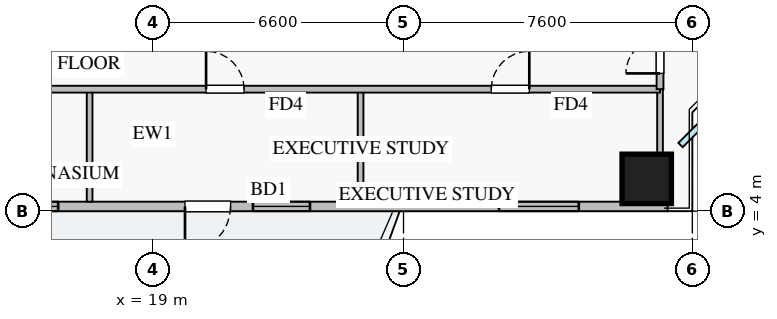
"""IFC4 building model, lengths in metres.
Left out: names, types, materials, properties, quantities, classifications, styles, units other than length and angle.
Written with IfcOpenShell. Run it as: python <this file> out.ifc"""

import sys

from ifc_helpers import new_model, si_unit, direction, frame, frame_2d, origin, origin_2d, place, context, subcontext, project, spatial, rectangle, extrude, source, transform, mapped, element, fill, save


model = new_model("IFC4")
c1 = context("Model", 3, precision=1e-05, world=origin(), true_north=direction((0.0, 1.0)))
c2 = subcontext(c1, "Body", "Model", "MODEL_VIEW")
j1 = project(units=[si_unit("LENGTHUNIT", "METRE"), si_unit("PLANEANGLEUNIT", "RADIAN")], contexts=[c1])
p1 = place(None, origin())
s1 = spatial("IfcSite", under=j1, at=p1, CompositionType="ELEMENT")
p2 = place(p1, origin())
s2 = spatial("IfcBuilding", under=s1, at=p2, CompositionType="ELEMENT")
p3 = place(p2, frame((0.0, 0.0, 89.25)))
s3 = spatial("IfcBuildingStorey", under=s2, at=p3, CompositionType="ELEMENT", Elevation=89.25)
m1 = source(origin(), c2, "Body", "SweptSolid", [
    extrude(rectangle(XDim=1.3, YDim=1.3, at=origin_2d()), origin(), (0.0, 0.0, 1.0), 3.25),
])
p4 = place(p3, frame((32.0, 4.85, 0.0), z_axis=(0.0, 0.0, 1.0), x_axis=(1.0, 0.0, 0.0)))
e1 = element("IfcColumn", 1, at=p4, inside=s3, PredefinedType="COLUMN", context=c2, shape_type="MappedRepresentation", body=[
    mapped(m1, transform((0.0, 0.0, 0.0), x_axis=(1.0, 0.0, 0.0), y_axis=(0.0, 1.0, 0.0), z_axis=(0.0, 0.0, 1.0), scale=1.0)),
])
p5 = place(p3, frame((5.45, 4.125, 0.0), z_axis=(0.0, 0.0, 1.0), x_axis=(1.0, 0.0, 0.0)))
e2 = element("IfcWall", 2, at=p5, inside=s3, PredefinedType="STANDARD", context=c2, shape_type="SweptSolid", body=[
    extrude(rectangle(XDim=27.1, YDim=0.25, at=frame_2d((13.55, 0.0))), origin(), (0.0, 0.0, 1.0), 2.57),
])
p6 = place(p5, frame((14.4, 0.0, 0.0)))
e3 = element("IfcOpeningElement", 3, at=p6, cuts=e2, PredefinedType="OPENING", context=c2, shape_type="SweptSolid", body=[
    extrude(rectangle(XDim=1.2, YDim=2.1, at=frame_2d((0.6, 1.05))), frame((0.0, 0.135, 0.0), z_axis=(0.0, -1.0, 0.0), x_axis=(1.0, 0.0, 0.0)), (0.0, 0.0, 1.0), 0.27),
])
p7 = place(p5, frame((1.45, 0.0, 0.9)))
e4 = element("IfcOpeningElement", 4, at=p7, cuts=e2, PredefinedType="OPENING", context=c2, shape_type="SweptSolid", body=[
    extrude(rectangle(XDim=1.5, YDim=1.5, at=frame_2d((0.75, 0.75))), frame((0.0, 0.135, 0.0), z_axis=(0.0, -1.0, 0.0), x_axis=(1.0, 0.0, 0.0)), (0.0, 0.0, 1.0), 0.27),
])
p8 = place(p5, frame((9.263, 0.0, 0.9)))
e5 = element("IfcOpeningElement", 5, at=p8, cuts=e2, PredefinedType="OPENING", context=c2, shape_type="SweptSolid", body=[
    extrude(rectangle(XDim=1.8, YDim=1.45, at=frame_2d((0.9, 0.725))), frame((0.0, 0.135, 0.0), z_axis=(0.0, -1.0, 0.0), x_axis=(1.0, 0.0, 0.0)), (0.0, 0.0, 1.0), 0.27),
])
p9 = place(p5, frame((16.188, 0.0, 0.9)))
e6 = element("IfcOpeningElement", 6, at=p9, cuts=e2, PredefinedType="OPENING", context=c2, shape_type="SweptSolid", body=[
    extrude(rectangle(XDim=1.5, YDim=1.45, at=frame_2d((0.75, 0.725))), frame((0.0, 0.135, 0.0), z_axis=(0.0, -1.0, 0.0), x_axis=(1.0, 0.0, 0.0)), (0.0, 0.0, 1.0), 0.27),
])
p10 = place(p5, frame((22.663, 0.0, 0.9)))
e7 = element("IfcOpeningElement", 7, at=p10, cuts=e2, PredefinedType="OPENING", context=c2, shape_type="SweptSolid", body=[
    extrude(rectangle(XDim=2.1, YDim=1.48, at=frame_2d((1.05, 0.74))), frame((0.0, 0.135, 0.0), z_axis=(0.0, -1.0, 0.0), x_axis=(1.0, 0.0, 0.0)), (0.0, 0.0, 1.0), 0.27),
])
p11 = place(p5, frame((5.084, 0.0, 0.9)))
e8 = element("IfcOpeningElement", 8, at=p11, cuts=e2, PredefinedType="OPENING", context=c2, shape_type="SweptSolid", body=[
    extrude(rectangle(XDim=2.4, YDim=1.5, at=frame_2d((1.2, 0.75))), frame((0.0, 0.135, 0.0), z_axis=(0.0, -1.0, 0.0), x_axis=(1.0, 0.0, 0.0)), (0.0, 0.0, 1.0), 0.27),
])
for number, where, z_axis, x_axis in (
    (9, (17.34, 4.25, 0.0), (0.0, 0.0, 1.0), (0.0, 1.0, 0.0)),
    (10, (24.47, 4.25, 0.0), (0.0, 0.0, 1.0), (0.0, 1.0, 0.0)),
    (11, (32.35, 4.25, 0.0), (0.0, 0.0, 1.0), (0.0, 1.0, 0.0)),
):
    element("IfcWall", number, at=place(p3, frame(where, z_axis=z_axis, x_axis=x_axis)), inside=s3, PredefinedType="PARTITIONING", context=c2, shape_type="SweptSolid", body=[
        extrude(rectangle(XDim=2.96, YDim=0.15, at=frame_2d((1.48, 0.0))), origin(), (0.0, 0.0, 1.0), 3.03),
    ])
p12 = place(p3, frame((8.72, 7.21, 0.0), z_axis=(0.0, 0.0, 1.0), x_axis=(1.0, 0.0, 0.0)))
e12 = element("IfcWall", 12, at=p12, inside=s3, PredefinedType="PARTITIONING", context=c2, shape_type="SweptSolid", body=[
    extrude(rectangle(XDim=23.63, YDim=0.18, at=frame_2d((11.815, 0.0))), origin(), (0.0, 0.0, 1.0), 3.03),
])
p13 = place(p12, frame((3.81, 0.0, 0.0)))
e13 = element("IfcOpeningElement", 13, at=p13, cuts=e12, PredefinedType="OPENING", context=c2, shape_type="SweptSolid", body=[
    extrude(rectangle(XDim=1.0, YDim=2.05, at=frame_2d((0.5, 1.025))), frame((0.0, 0.1, 0.0), z_axis=(0.0, -1.0, 0.0), x_axis=(1.0, 0.0, 0.0)), (0.0, 0.0, 1.0), 0.2),
])
p14 = place(p12, frame((11.685, 0.0, 0.0)))
e14 = element("IfcOpeningElement", 14, at=p14, cuts=e12, PredefinedType="OPENING", context=c2, shape_type="SweptSolid", body=[
    extrude(rectangle(XDim=1.0, YDim=2.05, at=frame_2d((0.5, 1.025))), frame((0.0, 0.1, 0.0), z_axis=(0.0, -1.0, 0.0), x_axis=(1.0, 0.0, 0.0)), (0.0, 0.0, 1.0), 0.2),
])
p15 = place(p12, frame((19.19, 0.0, 0.0)))
e15 = element("IfcOpeningElement", 15, at=p15, cuts=e12, PredefinedType="OPENING", context=c2, shape_type="SweptSolid", body=[
    extrude(rectangle(XDim=1.0, YDim=2.05, at=frame_2d((0.5, 1.025))), frame((0.0, 0.1, 0.0), z_axis=(0.0, -1.0, 0.0), x_axis=(1.0, 0.0, 0.0)), (0.0, 0.0, 1.0), 0.2),
])
p16 = place(p3, frame((32.35, 7.21, 0.0), z_axis=(0.0, 0.0, 1.0), x_axis=(0.0, 1.0, 0.0)))
e16 = element("IfcWall", 16, at=p16, inside=s3, PredefinedType="PARTITIONING", context=c2, shape_type="SweptSolid", body=[
    extrude(rectangle(XDim=31.23, YDim=0.18, at=frame_2d((15.615, 0.0))), origin(), (0.0, 0.0, 1.0), 2.725),
])
p17 = place(p16, frame((30.09, 0.0, 0.0)))
e17 = element("IfcOpeningElement", 17, at=p17, cuts=e16, PredefinedType="OPENING", context=c2, shape_type="SweptSolid", body=[
    extrude(rectangle(XDim=0.9, YDim=2.05, at=frame_2d((0.45, 1.025))), frame((0.0, 0.1, 0.0), z_axis=(0.0, -1.0, 0.0), x_axis=(1.0, 0.0, 0.0)), (0.0, 0.0, 1.0), 0.2),
])
p18 = place(p16, frame((0.415, 0.0, 0.0)))
e18 = element("IfcOpeningElement", 18, at=p18, cuts=e16, PredefinedType="OPENING", context=c2, shape_type="SweptSolid", body=[
    extrude(rectangle(XDim=0.9, YDim=2.05, at=frame_2d((0.45, 1.025))), frame((0.0, 0.1, 0.0), z_axis=(0.0, -1.0, 0.0), x_axis=(1.0, 0.0, 0.0)), (0.0, 0.0, 1.0), 0.2),
])
p19 = place(p16, frame((4.73, 0.0, 0.0)))
e19 = element("IfcOpeningElement", 19, at=p19, cuts=e16, PredefinedType="OPENING", context=c2, shape_type="SweptSolid", body=[
    extrude(rectangle(XDim=1.0, YDim=2.05, at=frame_2d((0.5, 1.025))), frame((0.0, 0.1, 0.0), z_axis=(0.0, -1.0, 0.0), x_axis=(1.0, 0.0, 0.0)), (0.0, 0.0, 1.0), 0.2),
])
p20 = place(p16, frame((18.655, 0.0, 0.0)))
e20 = element("IfcOpeningElement", 20, at=p20, cuts=e16, PredefinedType="OPENING", context=c2, shape_type="SweptSolid", body=[
    extrude(rectangle(XDim=1.0, YDim=2.05, at=frame_2d((0.5, 1.025))), frame((0.0, 0.1, 0.0), z_axis=(0.0, -1.0, 0.0), x_axis=(1.0, 0.0, 0.0)), (0.0, 0.0, 1.0), 0.2),
])
m2 = source(origin(), c2, "Body", "SweptSolid", [
    extrude(rectangle(XDim=1.2, YDim=2.1, at=frame_2d((0.6, 1.05))), frame((0.0, 0.025, 0.0), z_axis=(0.0, -1.0, 0.0), x_axis=(1.0, 0.0, 0.0)), (0.0, 0.0, 1.0), 0.05),
])
p21 = place(p6, frame((1.2, 0.0, 0.0), z_axis=(0.0, 0.0, 1.0), x_axis=(-1.0, 0.0, 0.0)))
e21 = element("IfcDoor", 21, at=p21, inside=s3, OperationType="SINGLE_SWING_LEFT", PredefinedType="DOOR", context=c2, shape_type="MappedRepresentation", body=[
    mapped(m2, transform((0.0, 0.0, 0.0), x_axis=(1.0, 0.0, 0.0), y_axis=(0.0, 1.0, 0.0), z_axis=(0.0, 0.0, 1.0), scale=1.0)),
])
fill(e3, e21)
m3 = source(origin(), c2, "Body", "SweptSolid", [
    extrude(rectangle(XDim=1.8, YDim=1.45, at=frame_2d((0.9, 0.725))), frame((0.0, 0.03, 0.0), z_axis=(0.0, -1.0, 0.0), x_axis=(1.0, 0.0, 0.0)), (0.0, 0.0, 1.0), 0.06),
])
p22 = place(p8, origin())
e22 = element("IfcWindow", 22, at=p22, inside=s3, PartitioningType="DOUBLE_PANEL_VERTICAL", PredefinedType="WINDOW", context=c2, shape_type="MappedRepresentation", body=[
    mapped(m3, transform((0.0, 0.0, 0.0), x_axis=(1.0, 0.0, 0.0), y_axis=(0.0, 1.0, 0.0), z_axis=(0.0, 0.0, 1.0), scale=1.0)),
])
fill(e5, e22)
m4 = source(origin(), c2, "Body", "SweptSolid", [
    extrude(rectangle(XDim=1.5, YDim=1.45, at=frame_2d((0.75, 0.725))), frame((0.0, 0.03, 0.0), z_axis=(0.0, -1.0, 0.0), x_axis=(1.0, 0.0, 0.0)), (0.0, 0.0, 1.0), 0.06),
])
p23 = place(p9, origin())
e23 = element("IfcWindow", 23, at=p23, inside=s3, PartitioningType="DOUBLE_PANEL_VERTICAL", PredefinedType="WINDOW", context=c2, shape_type="MappedRepresentation", body=[
    mapped(m4, transform((0.0, 0.0, 0.0), x_axis=(1.0, 0.0, 0.0), y_axis=(0.0, 1.0, 0.0), z_axis=(0.0, 0.0, 1.0), scale=1.0)),
])
fill(e6, e23)
m5 = source(origin(), c2, "Body", "SweptSolid", [
    extrude(rectangle(XDim=2.1, YDim=1.48, at=frame_2d((1.05, 0.74))), frame((0.0, 0.03, 0.0), z_axis=(0.0, -1.0, 0.0), x_axis=(1.0, 0.0, 0.0)), (0.0, 0.0, 1.0), 0.06),
])
p24 = place(p10, origin())
e24 = element("IfcWindow", 24, at=p24, inside=s3, PartitioningType="TRIPLE_PANEL_VERTICAL", PredefinedType="WINDOW", context=c2, shape_type="MappedRepresentation", body=[
    mapped(m5, transform((0.0, 0.0, 0.0), x_axis=(1.0, 0.0, 0.0), y_axis=(0.0, 1.0, 0.0), z_axis=(0.0, 0.0, 1.0), scale=1.0)),
])
fill(e7, e24)
m6 = source(origin(), c2, "Body", "SweptSolid", [
    extrude(rectangle(XDim=1.0, YDim=2.05, at=frame_2d((0.5, 1.025))), frame((0.0, 0.025, 0.0), z_axis=(0.0, -1.0, 0.0), x_axis=(1.0, 0.0, 0.0)), (0.0, 0.0, 1.0), 0.05),
])
p25 = place(p14, origin())
e25 = element("IfcDoor", 25, at=p25, inside=s3, OperationType="SINGLE_SWING_LEFT", PredefinedType="DOOR", context=c2, shape_type="MappedRepresentation", body=[
    mapped(m6, transform((0.0, 0.0, 0.0), x_axis=(1.0, 0.0, 0.0), y_axis=(0.0, 1.0, 0.0), z_axis=(0.0, 0.0, 1.0), scale=1.0)),
])
fill(e14, e25)
p26 = place(p15, origin())
e26 = element("IfcDoor", 26, at=p26, inside=s3, OperationType="SINGLE_SWING_RIGHT", PredefinedType="DOOR", context=c2, shape_type="MappedRepresentation", body=[
    mapped(m6, transform((0.0, 0.0, 0.0), x_axis=(1.0, 0.0, 0.0), y_axis=(0.0, 1.0, 0.0), z_axis=(0.0, 0.0, 1.0), scale=1.0)),
])
fill(e15, e26)
m7 = source(origin(), c2, "Body", "SweptSolid", [
    extrude(rectangle(XDim=0.9, YDim=2.05, at=frame_2d((0.45, 1.025))), frame((0.0, 0.025, 0.0), z_axis=(0.0, -1.0, 0.0), x_axis=(1.0, 0.0, 0.0)), (0.0, 0.0, 1.0), 0.05),
])
p27 = place(p18, origin())
e27 = element("IfcDoor", 27, at=p27, inside=s3, OperationType="SINGLE_SWING_LEFT", PredefinedType="DOOR", context=c2, shape_type="MappedRepresentation", body=[
    mapped(m7, transform((0.0, 0.0, 0.0), x_axis=(1.0, 0.0, 0.0), y_axis=(0.0, 1.0, 0.0), z_axis=(0.0, 0.0, 1.0), scale=1.0)),
])
fill(e18, e27)
save(model, sys.argv[1])
